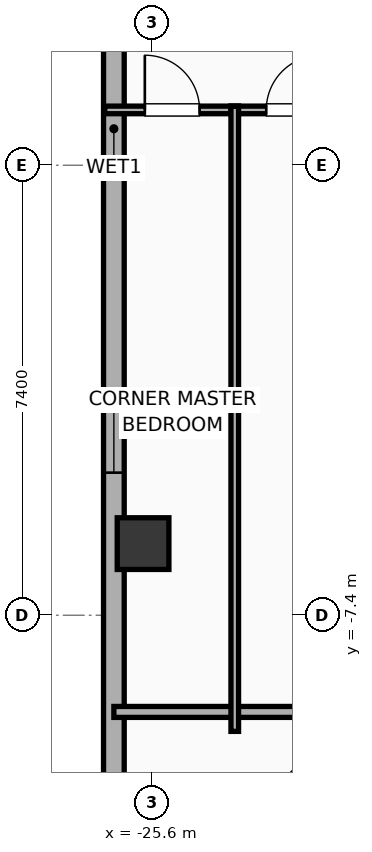
"""IFC4 building model, lengths in metres.
Left out: names, types, materials, properties, quantities, classifications, styles, units other than length and angle.
Written with IfcOpenShell. Run it as: python <this file> out.ifc"""

import sys

from ifc_helpers import new_model, si_unit, direction, frame, frame_2d, origin, origin_2d, place, context, subcontext, project, spatial, rectangle, hollow_rectangle, extrude, element, fill, save


model = new_model("IFC4")
c1 = context("Model", 3, precision=1e-05, world=origin(), true_north=direction((0.0, 1.0)))
c2 = subcontext(c1, "Body", "Model", "MODEL_VIEW")
j1 = project(units=[si_unit("LENGTHUNIT", "METRE"), si_unit("PLANEANGLEUNIT", "RADIAN")], contexts=[c1])
p1 = place(None, origin())
s1 = spatial("IfcSite", under=j1, at=p1, CompositionType="ELEMENT")
p2 = place(p1, origin())
s2 = spatial("IfcBuilding", under=s1, at=p2, CompositionType="ELEMENT")
p3 = place(p2, frame((0.0, 0.0, 247.0)))
s3 = spatial("IfcBuildingStorey", under=s2, at=p3, CompositionType="ELEMENT", Elevation=247.0)
p4 = place(p3, frame((-25.75, -6.222, 0.0), z_axis=(0.0, 0.0, 1.0), x_axis=(1.0, 0.0, 0.0)))
e1 = element("IfcColumn", 1, at=p4, inside=s3, PredefinedType="COLUMN", context=c2, shape_type="SweptSolid", body=[
    extrude(hollow_rectangle(XDim=0.85, YDim=0.85, WallThickness=0.028, at=origin_2d()), origin(), (0.0, 0.0, 1.0), 3.9),
])
p5 = place(p3, frame((-26.23, -15.383, 0.0), z_axis=(0.0, 0.0, 1.0), x_axis=(0.0, 1.0, 0.0)))
e2 = element("IfcWall", 2, at=p5, inside=s3, PredefinedType="ELEMENTEDWALL", context=c2, shape_type="SweptSolid", body=[
    extrude(rectangle(XDim=31.967, YDim=0.34, at=frame_2d((15.983, 0.0))), origin(), (0.0, 0.0, 1.0), 3.65),
])
p6 = place(p5, frame((29.21, 0.0, 0.75)))
e3 = element("IfcOpeningElement", 3, at=p6, cuts=e2, PredefinedType="OPENING", context=c2, shape_type="SweptSolid", body=[
    extrude(rectangle(XDim=1.2, YDim=2.05, at=frame_2d((0.6, 1.025))), frame((0.0, 0.18, 0.0), z_axis=(0.0, -1.0, 0.0), x_axis=(1.0, 0.0, 0.0)), (0.0, 0.0, 1.0), 0.36),
])
p7 = place(p5, frame((19.378, 0.0, 0.75)))
e4 = element("IfcOpeningElement", 4, at=p7, cuts=e2, PredefinedType="OPENING", context=c2, shape_type="SweptSolid", body=[
    extrude(rectangle(XDim=1.2, YDim=2.05, at=frame_2d((0.6, 1.025))), frame((0.0, 0.18, 0.0), z_axis=(0.0, -1.0, 0.0), x_axis=(1.0, 0.0, 0.0)), (0.0, 0.0, 1.0), 0.36),
])
p8 = place(p5, frame((10.328, 0.0, 0.75)))
e5 = element("IfcOpeningElement", 5, at=p8, cuts=e2, PredefinedType="OPENING", context=c2, shape_type="SweptSolid", body=[
    extrude(rectangle(XDim=1.2, YDim=2.05, at=frame_2d((0.6, 1.025))), frame((0.0, 0.18, 0.0), z_axis=(0.0, -1.0, 0.0), x_axis=(1.0, 0.0, 0.0)), (0.0, 0.0, 1.0), 0.36),
])
p9 = place(p3, frame((-26.23, -8.99, 0.0), z_axis=(0.0, 0.0, 1.0), x_axis=(1.0, 0.0, 0.0)))
e6 = element("IfcWall", 6, at=p9, inside=s3, PredefinedType="PARTITIONING", context=c2, shape_type="SweptSolid", body=[
    extrude(rectangle(XDim=16.35, YDim=0.18, at=frame_2d((8.175, 0.0))), origin(), (0.0, 0.0, 1.0), 3.65),
])
p10 = place(p3, frame((-26.38, 0.91, 0.0), z_axis=(0.0, 0.0, 1.0), x_axis=(1.0, 0.0, 0.0)))
e7 = element("IfcWall", 7, at=p10, inside=s3, PredefinedType="PARTITIONING", context=c2, shape_type="SweptSolid", body=[
    extrude(rectangle(XDim=2.2, YDim=0.125, at=frame_2d((1.1, 0.0))), origin(), (0.0, 0.0, 1.0), 3.65),
])
p11 = place(p10, frame((0.659, 0.0, 0.0)))
e8 = element("IfcOpeningElement", 8, at=p11, cuts=e7, PredefinedType="OPENING", context=c2, shape_type="SweptSolid", body=[
    extrude(rectangle(XDim=0.9, YDim=2.05, at=frame_2d((0.45, 1.025))), frame((0.0, 0.073, 0.0), z_axis=(0.0, -1.0, 0.0), x_axis=(1.0, 0.0, 0.0)), (0.0, 0.0, 1.0), 0.145),
])
p12 = place(p3, frame((-24.304, 0.91, 0.0), z_axis=(0.0, 0.0, 1.0), x_axis=(1.0, 0.0, 0.0)))
e9 = element("IfcWall", 9, at=p12, inside=s3, PredefinedType="PARTITIONING", context=c2, shape_type="SweptSolid", body=[
    extrude(rectangle(XDim=2.061, YDim=0.125, at=frame_2d((1.031, 0.0))), origin(), (0.0, 0.0, 1.0), 3.65),
])
p13 = place(p12, frame((0.581, 0.0, 0.0)))
e10 = element("IfcOpeningElement", 10, at=p13, cuts=e9, PredefinedType="OPENING", context=c2, shape_type="SweptSolid", body=[
    extrude(rectangle(XDim=0.9, YDim=2.05, at=frame_2d((0.45, 1.025))), frame((0.0, 0.073, 0.0), z_axis=(0.0, -1.0, 0.0), x_axis=(1.0, 0.0, 0.0)), (0.0, 0.0, 1.0), 0.145),
])
p14 = place(p3, frame((-24.242, -9.31, 0.0), z_axis=(0.0, 0.0, 1.0), x_axis=(0.0, 1.0, 0.0)))
e11 = element("IfcWall", 11, at=p14, inside=s3, PredefinedType="PARTITIONING", context=c2, shape_type="SweptSolid", body=[
    extrude(rectangle(XDim=10.28, YDim=0.125, at=frame_2d((5.14, 0.0))), origin(), (0.0, 0.0, 1.0), 3.65),
])
p15 = place(p8, origin())
e12 = element("IfcWindow", 12, at=p15, inside=s3, PartitioningType="SINGLE_PANEL", PredefinedType="WINDOW", context=c2, shape_type="SweptSolid", body=[
    extrude(rectangle(XDim=1.2, YDim=2.05, at=frame_2d((0.6, 1.025))), frame((0.0, 0.03, 0.0), z_axis=(0.0, -1.0, 0.0), x_axis=(1.0, 0.0, 0.0)), (0.0, 0.0, 1.0), 0.06),
])
fill(e5, e12)
p16 = place(p11, origin())
e13 = element("IfcDoor", 13, at=p16, inside=s3, OperationType="SINGLE_SWING_LEFT", PredefinedType="DOOR", context=c2, shape_type="SweptSolid", body=[
    extrude(rectangle(XDim=0.9, YDim=2.05, at=frame_2d((0.45, 1.025))), frame((0.0, 0.025, 0.0), z_axis=(0.0, -1.0, 0.0), x_axis=(1.0, 0.0, 0.0)), (0.0, 0.0, 1.0), 0.05),
])
fill(e8, e13)
p17 = place(p13, origin())
e14 = element("IfcDoor", 14, at=p17, inside=s3, OperationType="SINGLE_SWING_RIGHT", PredefinedType="DOOR", context=c2, shape_type="SweptSolid", body=[
    extrude(rectangle(XDim=0.9, YDim=2.05, at=frame_2d((0.45, 1.025))), frame((0.0, 0.025, 0.0), z_axis=(0.0, -1.0, 0.0), x_axis=(1.0, 0.0, 0.0)), (0.0, 0.0, 1.0), 0.05),
])
fill(e10, e14)
save(model, sys.argv[1])
